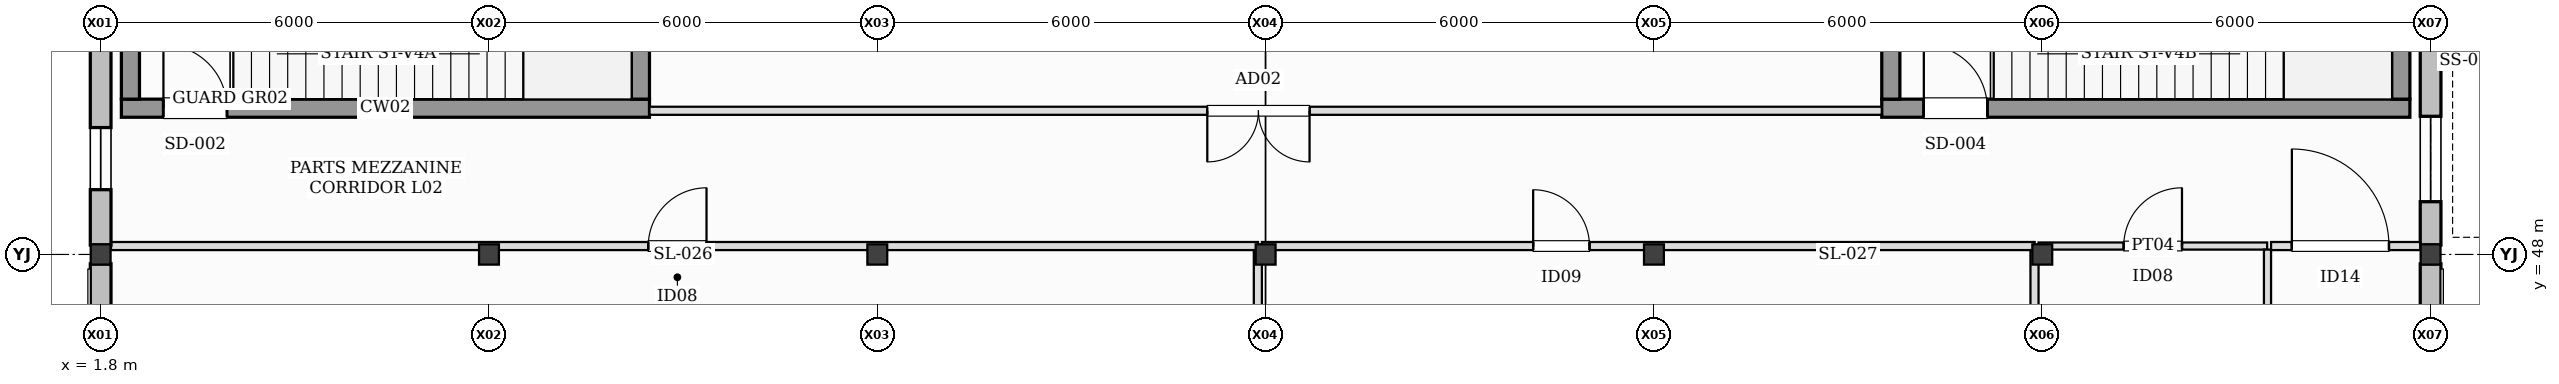
"""IFC4 building model, lengths in metres.
Left out: names, types, materials, properties, quantities, classifications, styles, units other than length and angle.
Written with IfcOpenShell. Run it as: python <this file> out.ifc"""

import sys

from ifc_helpers import new_model, si_unit, direction, frame, frame_2d, origin, origin_2d, place, context, subcontext, project, spatial, rectangle, i_section, extrude, element, fill, save


model = new_model("IFC4")
c1 = context("Model", 3, precision=1e-05, world=origin(), true_north=direction((0.0, 1.0)))
c2 = subcontext(c1, "Body", "Model", "MODEL_VIEW")
j1 = project(units=[si_unit("LENGTHUNIT", "METRE"), si_unit("PLANEANGLEUNIT", "RADIAN")], contexts=[c1])
p1 = place(None, origin())
s1 = spatial("IfcSite", under=j1, at=p1, CompositionType="ELEMENT")
p2 = place(p1, origin())
s2 = spatial("IfcBuilding", under=s1, at=p2, CompositionType="ELEMENT")
p3 = place(p2, frame((0.0, 0.0, 6.0)))
s3 = spatial("IfcBuildingStorey", under=s2, at=p3, CompositionType="ELEMENT", Elevation=6.0)
for number, where, z_axis, x_axis in (
    (1, (1.8, 48.0, 0.0), (0.0, 0.0, 1.0), (1.0, 0.0, 0.0)),
    (2, (7.8, 48.0, 0.0), (0.0, 0.0, 1.0), (1.0, 0.0, 0.0)),
    (3, (13.8, 48.0, 0.0), (0.0, 0.0, 1.0), (1.0, 0.0, 0.0)),
    (4, (19.8, 48.0, 0.0), (0.0, 0.0, 1.0), (1.0, 0.0, 0.0)),
    (5, (25.8, 48.0, 0.0), (0.0, 0.0, 1.0), (1.0, 0.0, 0.0)),
    (6, (31.8, 48.0, 0.0), (0.0, 0.0, 1.0), (1.0, 0.0, 0.0)),
    (7, (37.8, 48.0, 0.0), (0.0, 0.0, 1.0), (1.0, 0.0, 0.0)),
):
    element("IfcColumn", number, at=place(p3, frame(where, z_axis=z_axis, x_axis=x_axis)), inside=s3, PredefinedType="COLUMN", context=c2, shape_type="SweptSolid", body=[
        extrude(i_section(OverallWidth=0.307, OverallDepth=0.314, WebThickness=0.011, FlangeThickness=0.019, at=origin_2d()), origin(), (0.0, 0.0, 1.0), 4.0),
    ])
p4 = place(p3, frame((1.8, 47.855, 0.0), z_axis=(0.0, 0.0, 1.0), x_axis=(0.0, -1.0, 0.0)))
e8 = element("IfcWall", 8, at=p4, inside=s3, PredefinedType="STANDARD", context=c2, shape_type="SweptSolid", body=[
    extrude(rectangle(XDim=5.71, YDim=0.32, at=frame_2d((2.855, 0.0))), origin(), (0.0, 0.0, 1.0), 3.25),
])
p5 = place(p3, frame((1.8, 53.855, 0.0), z_axis=(0.0, 0.0, 1.0), x_axis=(0.0, -1.0, 0.0)))
e9 = element("IfcWall", 9, at=p5, inside=s3, PredefinedType="STANDARD", context=c2, shape_type="SweptSolid", body=[
    extrude(rectangle(XDim=5.71, YDim=0.32, at=frame_2d((2.855, 0.0))), origin(), (0.0, 0.0, 1.0), 3.25),
])
p6 = place(p5, frame((0.628, 0.0, 0.96)))
e10 = element("IfcOpeningElement", 10, at=p6, cuts=e9, PredefinedType="OPENING", context=c2, shape_type="SweptSolid", body=[
    extrude(rectangle(XDim=1.44, YDim=1.44, at=frame_2d((0.72, 0.72))), frame((0.0, 0.17, 0.0), z_axis=(0.0, -1.0, 0.0), x_axis=(1.0, 0.0, 0.0)), (0.0, 0.0, 1.0), 0.34),
])
p7 = place(p5, frame((3.894, 0.0, 0.86)))
e11 = element("IfcOpeningElement", 11, at=p7, cuts=e9, PredefinedType="OPENING", context=c2, shape_type="SweptSolid", body=[
    extrude(rectangle(XDim=0.96, YDim=0.96, at=frame_2d((0.48, 0.48))), frame((0.0, 0.17, 0.0), z_axis=(0.0, -1.0, 0.0), x_axis=(1.0, 0.0, 0.0)), (0.0, 0.0, 1.0), 0.34),
])
p8 = place(p3, frame((37.8, 42.145, 0.0), z_axis=(0.0, 0.0, 1.0), x_axis=(0.0, 1.0, 0.0)))
e12 = element("IfcWall", 12, at=p8, inside=s3, PredefinedType="STANDARD", context=c2, shape_type="SweptSolid", body=[
    extrude(rectangle(XDim=5.71, YDim=0.32, at=frame_2d((2.855, 0.0))), origin(), (0.0, 0.0, 1.0), 4.0),
])
p9 = place(p3, frame((37.8, 48.145, 0.0), z_axis=(0.0, 0.0, 1.0), x_axis=(0.0, 1.0, 0.0)))
e13 = element("IfcWall", 13, at=p9, inside=s3, PredefinedType="STANDARD", context=c2, shape_type="SweptSolid", body=[
    extrude(rectangle(XDim=5.71, YDim=0.32, at=frame_2d((2.855, 0.0))), origin(), (0.0, 0.0, 1.0), 4.0),
])
p10 = place(p9, frame((0.67, 0.0, 1.28)))
e14 = element("IfcOpeningElement", 14, at=p10, cuts=e13, PredefinedType="OPENING", context=c2, shape_type="SweptSolid", body=[
    extrude(rectangle(XDim=1.32, YDim=1.32, at=frame_2d((0.66, 0.66))), frame((0.0, 0.17, 0.0), z_axis=(0.0, -1.0, 0.0), x_axis=(1.0, 0.0, 0.0)), (0.0, 0.0, 1.0), 0.34),
])
p11 = place(p9, frame((3.504, 0.0, 1.18)))
e15 = element("IfcOpeningElement", 15, at=p11, cuts=e13, PredefinedType="OPENING", context=c2, shape_type="SweptSolid", body=[
    extrude(rectangle(XDim=1.56, YDim=1.56, at=frame_2d((0.78, 0.78))), frame((0.0, 0.17, 0.0), z_axis=(0.0, -1.0, 0.0), x_axis=(1.0, 0.0, 0.0)), (0.0, 0.0, 1.0), 0.34),
])
p12 = place(p3, frame((2.12, 50.26, 0.0), z_axis=(0.0, 0.0, 1.0), x_axis=(1.0, 0.0, 0.0)))
e16 = element("IfcWall", 16, at=p12, inside=s3, PredefinedType="SHEAR", context=c2, shape_type="SweptSolid", body=[
    extrude(rectangle(XDim=8.16, YDim=0.28, at=frame_2d((4.08, 0.0))), origin(), (0.0, 0.0, 1.0), 3.75),
])
p13 = place(p12, frame((0.65, 0.0, 0.0)))
e17 = element("IfcOpeningElement", 17, at=p13, cuts=e16, PredefinedType="OPENING", context=c2, shape_type="SweptSolid", body=[
    extrude(rectangle(XDim=0.98, YDim=2.15, at=frame_2d((0.49, 1.075))), frame((0.0, 0.15, 0.0), z_axis=(0.0, -1.0, 0.0), x_axis=(1.0, 0.0, 0.0)), (0.0, 0.0, 1.0), 0.3),
])
for number, where, z_axis, x_axis in (
    (18, (2.26, 53.4, 0.0), (0.0, 0.0, 1.0), (0.0, -1.0, 0.0)),
    (19, (10.14, 50.4, 0.0), (0.0, 0.0, 1.0), (0.0, 1.0, 0.0)),
):
    element("IfcWall", number, at=place(p3, frame(where, z_axis=z_axis, x_axis=x_axis)), inside=s3, PredefinedType="SHEAR", context=c2, shape_type="SweptSolid", body=[
        extrude(rectangle(XDim=3.0, YDim=0.28, at=frame_2d((1.5, 0.0))), origin(), (0.0, 0.0, 1.0), 3.75),
    ])
p14 = place(p3, frame((29.32, 50.26, 0.0), z_axis=(0.0, 0.0, 1.0), x_axis=(1.0, 0.0, 0.0)))
e20 = element("IfcWall", 20, at=p14, inside=s3, PredefinedType="SHEAR", context=c2, shape_type="SweptSolid", body=[
    extrude(rectangle(XDim=8.16, YDim=0.28, at=frame_2d((4.08, 0.0))), origin(), (0.0, 0.0, 1.0), 3.75),
])
p15 = place(p14, frame((0.65, 0.0, 0.0)))
e21 = element("IfcOpeningElement", 21, at=p15, cuts=e20, PredefinedType="OPENING", context=c2, shape_type="SweptSolid", body=[
    extrude(rectangle(XDim=0.98, YDim=2.15, at=frame_2d((0.49, 1.075))), frame((0.0, 0.15, 0.0), z_axis=(0.0, -1.0, 0.0), x_axis=(1.0, 0.0, 0.0)), (0.0, 0.0, 1.0), 0.3),
])
for number, where, z_axis, x_axis in (
    (22, (29.46, 53.4, 0.0), (0.0, 0.0, 1.0), (0.0, -1.0, 0.0)),
    (23, (37.34, 50.4, 0.0), (0.0, 0.0, 1.0), (0.0, 1.0, 0.0)),
):
    element("IfcWall", number, at=place(p3, frame(where, z_axis=z_axis, x_axis=x_axis)), inside=s3, PredefinedType="SHEAR", context=c2, shape_type="SweptSolid", body=[
        extrude(rectangle(XDim=3.0, YDim=0.28, at=frame_2d((1.5, 0.0))), origin(), (0.0, 0.0, 1.0), 3.75),
    ])
p16 = place(p3, frame((1.96, 48.13, 0.0), z_axis=(0.0, 0.0, 1.0), x_axis=(1.0, 0.0, 0.0)))
e24 = element("IfcWall", 24, at=p16, inside=s3, PredefinedType="PARTITIONING", context=c2, shape_type="SweptSolid", body=[
    extrude(rectangle(XDim=17.723, YDim=0.125, at=frame_2d((8.861, 0.0))), origin(), (0.0, 0.0, 1.0), 3.72),
])
p17 = place(p16, frame((8.301, 0.0, 0.0)))
e25 = element("IfcOpeningElement", 25, at=p17, cuts=e24, PredefinedType="OPENING", context=c2, shape_type="SweptSolid", body=[
    extrude(rectangle(XDim=0.9, YDim=2.1, at=frame_2d((0.45, 1.05))), frame((0.0, 0.073, 0.0), z_axis=(0.0, -1.0, 0.0), x_axis=(1.0, 0.0, 0.0)), (0.0, 0.0, 1.0), 0.145),
])
p18 = place(p3, frame((19.68, 48.067, 0.0), z_axis=(0.0, 0.0, 1.0), x_axis=(0.0, -1.0, 0.0)))
e26 = element("IfcWall", 26, at=p18, inside=s3, PredefinedType="PARTITIONING", context=c2, shape_type="SweptSolid", body=[
    extrude(rectangle(XDim=5.9, YDim=0.125, at=frame_2d((2.95, 0.0))), origin(), (0.0, 0.0, 1.0), 3.358),
])
p19 = place(p3, frame((19.742, 48.13, 0.0), z_axis=(0.0, 0.0, 1.0), x_axis=(1.0, 0.0, 0.0)))
e27 = element("IfcWall", 27, at=p19, inside=s3, PredefinedType="PARTITIONING", context=c2, shape_type="SweptSolid", body=[
    extrude(rectangle(XDim=11.94, YDim=0.125, at=frame_2d((5.97, 0.0))), origin(), (0.0, 0.0, 1.0), 3.72),
])
p20 = place(p19, frame((4.191, 0.0, 0.0)))
e28 = element("IfcOpeningElement", 28, at=p20, cuts=e27, PredefinedType="OPENING", context=c2, shape_type="SweptSolid", body=[
    extrude(rectangle(XDim=0.87, YDim=2.06, at=frame_2d((0.435, 1.03))), frame((0.0, 0.073, 0.0), z_axis=(0.0, -1.0, 0.0), x_axis=(1.0, 0.0, 0.0)), (0.0, 0.0, 1.0), 0.145),
])
p21 = place(p3, frame((31.68, 48.067, 0.0), z_axis=(0.0, 0.0, 1.0), x_axis=(0.0, -1.0, 0.0)))
e29 = element("IfcWall", 29, at=p21, inside=s3, PredefinedType="PARTITIONING", context=c2, shape_type="SweptSolid", body=[
    extrude(rectangle(XDim=5.9, YDim=0.125, at=frame_2d((2.95, 0.0))), origin(), (0.0, 0.0, 1.0), 3.72),
])
p22 = place(p3, frame((31.742, 48.13, 0.0), z_axis=(0.0, 0.0, 1.0), x_axis=(1.0, 0.0, 0.0)))
e30 = element("IfcWall", 30, at=p22, inside=s3, PredefinedType="PARTITIONING", context=c2, shape_type="SweptSolid", body=[
    extrude(rectangle(XDim=3.532, YDim=0.11, at=frame_2d((1.766, 0.0))), origin(), (0.0, 0.0, 1.0), 3.72),
])
p23 = place(p22, frame((1.316, 0.0, 0.0)))
e31 = element("IfcOpeningElement", 31, at=p23, cuts=e30, PredefinedType="OPENING", context=c2, shape_type="SweptSolid", body=[
    extrude(rectangle(XDim=0.9, YDim=2.1, at=frame_2d((0.45, 1.05))), frame((0.0, 0.065, 0.0), z_axis=(0.0, -1.0, 0.0), x_axis=(1.0, 0.0, 0.0)), (0.0, 0.0, 1.0), 0.13),
])
p24 = place(p3, frame((35.28, 48.075, 0.0), z_axis=(0.0, 0.0, 1.0), x_axis=(0.0, -1.0, 0.0)))
e32 = element("IfcWall", 32, at=p24, inside=s3, PredefinedType="PARTITIONING", context=c2, shape_type="SweptSolid", body=[
    extrude(rectangle(XDim=5.9, YDim=0.11, at=frame_2d((2.95, 0.0))), origin(), (0.0, 0.0, 1.0), 3.72),
])
p25 = place(p3, frame((35.335, 48.13, 0.0), z_axis=(0.0, 0.0, 1.0), x_axis=(1.0, 0.0, 0.0)))
e33 = element("IfcWall", 33, at=p25, inside=s3, PredefinedType="PARTITIONING", context=c2, shape_type="SweptSolid", body=[
    extrude(rectangle(XDim=2.305, YDim=0.125, at=frame_2d((1.152, 0.0))), origin(), (0.0, 0.0, 1.0), 3.72),
])
p26 = place(p25, frame((0.322, 0.0, 0.0)))
e34 = element("IfcOpeningElement", 34, at=p26, cuts=e33, PredefinedType="OPENING", context=c2, shape_type="SweptSolid", body=[
    extrude(rectangle(XDim=1.5, YDim=2.22, at=frame_2d((0.75, 1.11))), frame((0.0, 0.073, 0.0), z_axis=(0.0, -1.0, 0.0), x_axis=(1.0, 0.0, 0.0)), (0.0, 0.0, 1.0), 0.145),
])
p27 = place(p3, frame((29.32, 50.22, 0.0), z_axis=(0.0, 0.0, 1.0), x_axis=(-1.0, 0.0, 0.0)))
e35 = element("IfcWall", 35, at=p27, inside=s3, PredefinedType="PARTITIONING", context=c2, shape_type="SweptSolid", body=[
    extrude(rectangle(XDim=19.04, YDim=0.125, at=frame_2d((9.52, 0.0))), origin(), (0.0, 0.0, 1.0), 3.72),
])
p28 = place(p27, frame((8.841, 0.0, 0.0)))
e36 = element("IfcOpeningElement", 36, at=p28, cuts=e35, PredefinedType="OPENING", context=c2, shape_type="SweptSolid", body=[
    extrude(rectangle(XDim=1.58, YDim=2.2, at=frame_2d((0.79, 1.1))), frame((0.0, 0.073, 0.0), z_axis=(0.0, -1.0, 0.0), x_axis=(1.0, 0.0, 0.0)), (0.0, 0.0, 1.0), 0.145),
])
p29 = place(p7, origin())
e37 = element("IfcWindow", 37, at=p29, inside=s3, PartitioningType="SINGLE_PANEL", PredefinedType="WINDOW", context=c2, shape_type="SweptSolid", body=[
    extrude(rectangle(XDim=0.96, YDim=0.96, at=frame_2d((0.48, 0.48))), frame((0.0, 0.03, 0.0), z_axis=(0.0, -1.0, 0.0), x_axis=(1.0, 0.0, 0.0)), (0.0, 0.0, 1.0), 0.06),
])
fill(e11, e37)
p30 = place(p10, origin())
e38 = element("IfcWindow", 38, at=p30, inside=s3, PartitioningType="SINGLE_PANEL", PredefinedType="WINDOW", context=c2, shape_type="SweptSolid", body=[
    extrude(rectangle(XDim=1.32, YDim=1.32, at=frame_2d((0.66, 0.66))), frame((0.0, 0.03, 0.0), z_axis=(0.0, -1.0, 0.0), x_axis=(1.0, 0.0, 0.0)), (0.0, 0.0, 1.0), 0.06),
])
fill(e14, e38)
p31 = place(p13, origin())
e39 = element("IfcDoor", 39, at=p31, inside=s3, OperationType="SINGLE_SWING_LEFT", PredefinedType="DOOR", context=c2, shape_type="SweptSolid", body=[
    extrude(rectangle(XDim=0.98, YDim=2.15, at=frame_2d((0.49, 1.075))), frame((0.0, 0.025, 0.0), z_axis=(0.0, -1.0, 0.0), x_axis=(1.0, 0.0, 0.0)), (0.0, 0.0, 1.0), 0.05),
])
fill(e17, e39)
p32 = place(p15, origin())
e40 = element("IfcDoor", 40, at=p32, inside=s3, OperationType="SINGLE_SWING_LEFT", PredefinedType="DOOR", context=c2, shape_type="SweptSolid", body=[
    extrude(rectangle(XDim=0.98, YDim=2.15, at=frame_2d((0.49, 1.075))), frame((0.0, 0.025, 0.0), z_axis=(0.0, -1.0, 0.0), x_axis=(1.0, 0.0, 0.0)), (0.0, 0.0, 1.0), 0.05),
])
fill(e21, e40)
p33 = place(p17, frame((0.9, 0.0, 0.0), z_axis=(0.0, 0.0, 1.0), x_axis=(-1.0, 0.0, 0.0)))
e41 = element("IfcDoor", 41, at=p33, inside=s3, OperationType="SINGLE_SWING_RIGHT", PredefinedType="DOOR", context=c2, shape_type="SweptSolid", body=[
    extrude(rectangle(XDim=0.9, YDim=2.1, at=frame_2d((0.45, 1.05))), frame((0.0, 0.025, 0.0), z_axis=(0.0, -1.0, 0.0), x_axis=(1.0, 0.0, 0.0)), (0.0, 0.0, 1.0), 0.05),
])
fill(e25, e41)
p34 = place(p20, frame((0.87, 0.0, 0.0), z_axis=(0.0, 0.0, 1.0), x_axis=(-1.0, 0.0, 0.0)))
e42 = element("IfcDoor", 42, at=p34, inside=s3, OperationType="SINGLE_SWING_LEFT", PredefinedType="DOOR", context=c2, shape_type="SweptSolid", body=[
    extrude(rectangle(XDim=0.87, YDim=2.06, at=frame_2d((0.435, 1.03))), frame((0.0, 0.025, 0.0), z_axis=(0.0, -1.0, 0.0), x_axis=(1.0, 0.0, 0.0)), (0.0, 0.0, 1.0), 0.05),
])
fill(e28, e42)
p35 = place(p23, frame((0.9, 0.0, 0.0), z_axis=(0.0, 0.0, 1.0), x_axis=(-1.0, 0.0, 0.0)))
e43 = element("IfcDoor", 43, at=p35, inside=s3, OperationType="SINGLE_SWING_RIGHT", PredefinedType="DOOR", context=c2, shape_type="SweptSolid", body=[
    extrude(rectangle(XDim=0.9, YDim=2.1, at=frame_2d((0.45, 1.05))), frame((0.0, 0.025, 0.0), z_axis=(0.0, -1.0, 0.0), x_axis=(1.0, 0.0, 0.0)), (0.0, 0.0, 1.0), 0.05),
])
fill(e31, e43)
p36 = place(p26, frame((1.5, 0.0, 0.0), z_axis=(0.0, 0.0, 1.0), x_axis=(-1.0, 0.0, 0.0)))
e44 = element("IfcDoor", 44, at=p36, inside=s3, OperationType="SINGLE_SWING_LEFT", PredefinedType="DOOR", context=c2, shape_type="SweptSolid", body=[
    extrude(rectangle(XDim=1.5, YDim=2.22, at=frame_2d((0.75, 1.11))), frame((0.0, 0.025, 0.0), z_axis=(0.0, -1.0, 0.0), x_axis=(1.0, 0.0, 0.0)), (0.0, 0.0, 1.0), 0.05),
])
fill(e34, e44)
p37 = place(p28, frame((1.58, 0.0, 0.0), z_axis=(0.0, 0.0, 1.0), x_axis=(-1.0, 0.0, 0.0)))
e45 = element("IfcDoor", 45, at=p37, inside=s3, OperationType="DOUBLE_DOOR_SINGLE_SWING", PredefinedType="DOOR", context=c2, shape_type="SweptSolid", body=[
    extrude(rectangle(XDim=1.58, YDim=2.2, at=frame_2d((0.79, 1.1))), frame((0.0, 0.025, 0.0), z_axis=(0.0, -1.0, 0.0), x_axis=(1.0, 0.0, 0.0)), (0.0, 0.0, 1.0), 0.05),
])
fill(e36, e45)
save(model, sys.argv[1])
